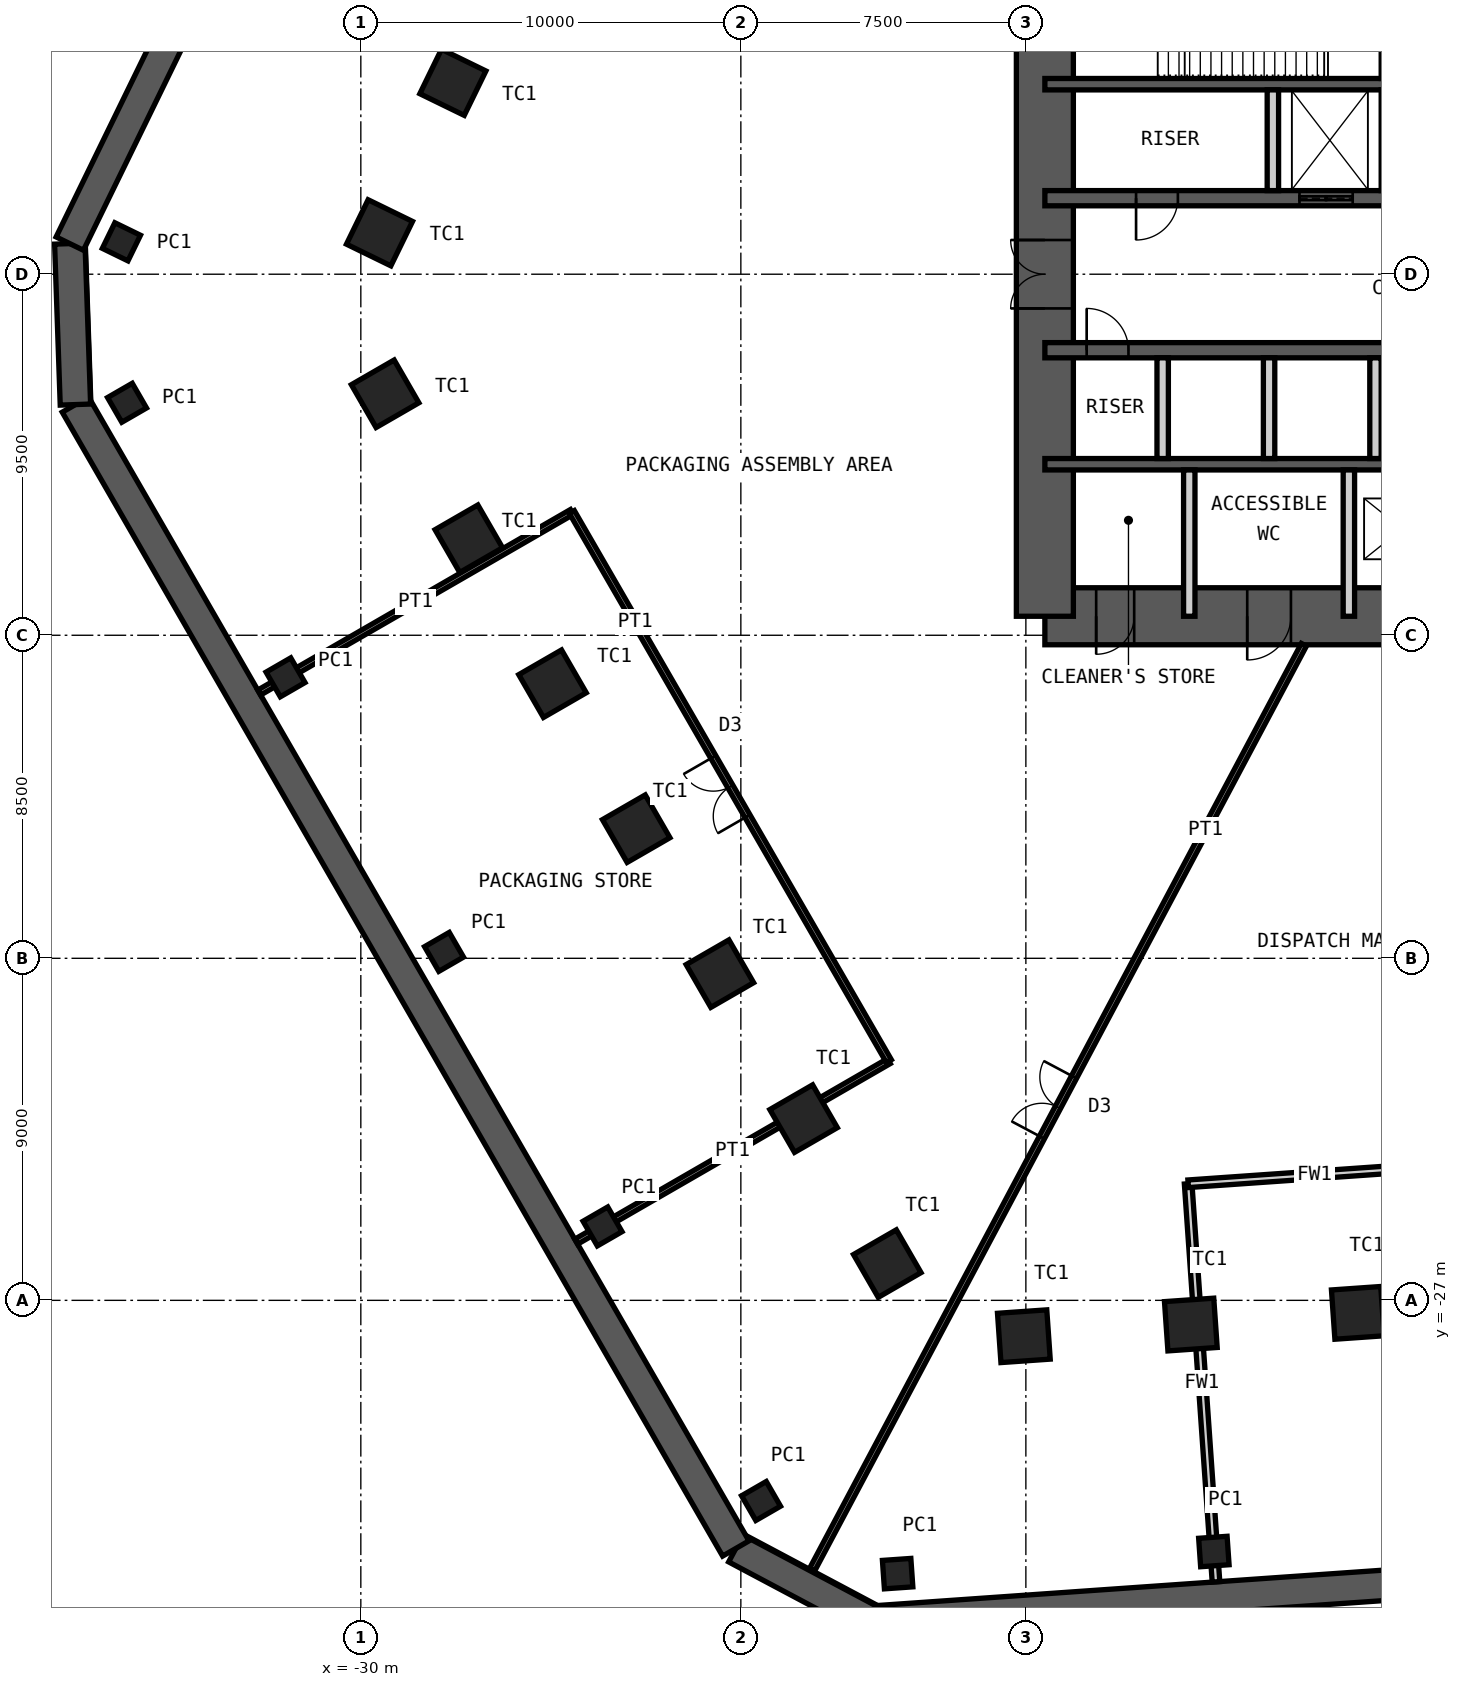
"""IFC4 building model, lengths in metres.
Left out: names, types, materials, properties, quantities, classifications, styles, units other than length and angle.
Written with IfcOpenShell. Run it as: python <this file> out.ifc"""

import sys

from ifc_helpers import new_model, si_unit, direction, frame, frame_2d, origin, origin_2d, place, context, subcontext, project, spatial, rectangle, hollow_rectangle, extrude, element, fill, save


model = new_model("IFC4")
c1 = context("Model", 3, precision=1e-05, world=origin(), true_north=direction((0.0, 1.0)))
c2 = subcontext(c1, "Body", "Model", "MODEL_VIEW")
j1 = project(units=[si_unit("LENGTHUNIT", "METRE"), si_unit("PLANEANGLEUNIT", "RADIAN")], contexts=[c1])
p1 = place(None, origin())
s1 = spatial("IfcSite", under=j1, at=p1, CompositionType="ELEMENT")
p2 = place(p1, origin())
s2 = spatial("IfcBuilding", under=s1, at=p2, CompositionType="ELEMENT")
p3 = place(p2, frame((0.0, 0.0, -6.0)))
s3 = spatial("IfcBuildingStorey", under=s2, at=p3, CompositionType="ELEMENT", Elevation=-6.0)
p4 = place(p3, frame((18.132, -33.016, 0.0), z_axis=(0.0, 0.0, 1.0), x_axis=(-0.997564165932, -0.069754819538, 0.0)))
e1 = element("IfcWall", 1, at=p4, inside=s3, PredefinedType="SHEAR", context=c2, shape_type="SweptSolid", body=[
    extrude(rectangle(XDim=34.755, YDim=0.8, at=frame_2d((17.377, 0.0))), origin(), (0.0, 0.0, 1.0), 6.0),
])
p5 = place(p3, frame((-16.539, -35.44, 0.0), z_axis=(0.0, 0.0, 1.0), x_axis=(-0.882968133669, 0.469432929101, 0.0)))
e2 = element("IfcWall", 2, at=p5, inside=s3, PredefinedType="SHEAR", context=c2, shape_type="SweptSolid", body=[
    extrude(rectangle(XDim=4.071, YDim=0.8, at=frame_2d((2.035, 0.0))), origin(), (0.0, 0.0, 1.0), 6.0),
])
p6 = place(p3, frame((-20.133, -33.529, 0.0), z_axis=(0.0, 0.0, 1.0), x_axis=(-0.499996691743, 0.866027313799, 0.0)))
e3 = element("IfcWall", 3, at=p6, inside=s3, PredefinedType="SHEAR", context=c2, shape_type="SweptSolid", body=[
    extrude(rectangle(XDim=34.755, YDim=0.8, at=frame_2d((17.377, 0.0))), origin(), (0.0, 0.0, 1.0), 6.0),
])
p7 = place(p3, frame((-37.51, -3.43, 0.0), z_axis=(0.0, 0.0, 1.0), x_axis=(-0.034908677553, 0.999390506375, 0.0)))
e4 = element("IfcWall", 4, at=p7, inside=s3, PredefinedType="SHEAR", context=c2, shape_type="SweptSolid", body=[
    extrude(rectangle(XDim=4.238, YDim=0.8, at=frame_2d((2.119, 0.0))), origin(), (0.0, 0.0, 1.0), 6.0),
])
p8 = place(p3, frame((-37.658, 0.805, 0.0), z_axis=(0.0, 0.0, 1.0), x_axis=(0.438371731429, 0.898793761151, 0.0)))
e5 = element("IfcWall", 5, at=p8, inside=s3, PredefinedType="SHEAR", context=c2, shape_type="SweptSolid", body=[
    extrude(rectangle(XDim=34.755, YDim=0.8, at=frame_2d((17.377, 0.0))), origin(), (0.0, 0.0, 1.0), 6.0),
])
for number, where, z_axis, x_axis in (
    (6, (-3.765, -27.329, 0.0), (0.0, 0.0, 1.0), (0.998, 0.07, 0.0)),
    (7, (-8.159, -27.636, 0.0), (0.0, 0.0, 1.0), (0.998, 0.07, 0.0)),
    (8, (-12.553, -27.944, 0.0), (0.0, 0.0, 1.0), (0.998, 0.07, 0.0)),
    (9, (-16.147, -26.033, 0.0), (0.0, 0.0, 1.0), (0.5, -0.866, 0.0)),
    (10, (-18.349, -22.218, 0.0), (0.0, 0.0, 1.0), (0.5, -0.866, 0.0)),
    (11, (-20.552, -18.404, 0.0), (0.0, 0.0, 1.0), (0.5, -0.866, 0.0)),
    (12, (-22.754, -14.589, 0.0), (0.0, 0.0, 1.0), (0.5, -0.866, 0.0)),
    (13, (-24.956, -10.775, 0.0), (0.0, 0.0, 1.0), (0.5, -0.866, 0.0)),
    (14, (-27.158, -6.96, 0.0), (0.0, 0.0, 1.0), (0.5, -0.866, 0.0)),
    (15, (-29.361, -3.146, 0.0), (0.0, 0.0, 1.0), (0.5, -0.866, 0.0)),
    (16, (-29.509, 1.09, 0.0), (0.0, 0.0, 1.0), (-0.438, -0.899, 0.0)),
    (17, (-27.578, 5.049, 0.0), (0.0, 0.0, 1.0), (-0.438, -0.899, 0.0)),
):
    element("IfcColumn", number, at=place(p3, frame(where, z_axis=z_axis, x_axis=x_axis)), inside=s3, PredefinedType="COLUMN", context=c2, shape_type="SweptSolid", body=[
        extrude(hollow_rectangle(XDim=1.3, YDim=1.3, WallThickness=0.1, at=origin_2d()), origin(), (0.0, 0.0, 1.0), 6.0),
    ])
for number, where, z_axis, x_axis in (
    (18, (-7.553, -33.609, 0.0), (0.0, 0.0, 1.0), (0.998, 0.07, 0.0)),
    (19, (-19.469, -32.28, 0.0), (0.0, 0.0, 1.0), (0.5, -0.866, 0.0)),
    (20, (-23.639, -25.055, 0.0), (0.0, 0.0, 1.0), (0.5, -0.866, 0.0)),
    (21, (-27.81, -17.831, 0.0), (0.0, 0.0, 1.0), (0.5, -0.866, 0.0)),
    (22, (-31.981, -10.607, 0.0), (0.0, 0.0, 1.0), (0.5, -0.866, 0.0)),
    (23, (-36.3, 0.853, 0.0), (0.0, 0.0, 1.0), (-0.438, -0.899, 0.0)),
    (24, (-15.874, -34.191, 0.0), (0.0, 0.0, 1.0), (0.998, 0.07, 0.0)),
    (25, (-36.152, -3.383, 0.0), (0.0, 0.0, 1.0), (0.5, -0.866, 0.0)),
):
    element("IfcColumn", number, at=place(p3, frame(where, z_axis=z_axis, x_axis=x_axis)), inside=s3, PredefinedType="COLUMN", context=c2, shape_type="SweptSolid", body=[
        extrude(hollow_rectangle(XDim=0.75, YDim=0.75, WallThickness=0.036, at=origin_2d()), origin(), (0.0, 0.0, 1.0), 6.0),
    ])
p9 = place(p3, frame((-12.0, -9.0, 0.0), z_axis=(0.0, 0.0, 1.0), x_axis=(1.0, 0.0, 0.0)))
e26 = element("IfcWall", 26, at=p9, inside=s3, PredefinedType="SHEAR", context=c2, shape_type="SweptSolid", body=[
    extrude(rectangle(XDim=24.0, YDim=1.5, at=frame_2d((12.0, 0.0))), origin(), (0.0, 0.0, 1.0), 6.0),
])
p10 = place(p9, frame((1.35, 0.0, 0.0)))
e27 = element("IfcOpeningElement", 27, at=p10, cuts=e26, PredefinedType="OPENING", context=c2, shape_type="SweptSolid", body=[
    extrude(rectangle(XDim=1.0, YDim=2.1, at=frame_2d((0.5, 1.05))), frame((0.0, 0.76, 0.0), z_axis=(0.0, -1.0, 0.0), x_axis=(1.0, 0.0, 0.0)), (0.0, 0.0, 1.0), 1.52),
])
p11 = place(p9, frame((5.325, 0.0, 0.0)))
e28 = element("IfcOpeningElement", 28, at=p11, cuts=e26, PredefinedType="OPENING", context=c2, shape_type="SweptSolid", body=[
    extrude(rectangle(XDim=1.15, YDim=2.1, at=frame_2d((0.575, 1.05))), frame((0.0, 0.76, 0.0), z_axis=(0.0, -1.0, 0.0), x_axis=(1.0, 0.0, 0.0)), (0.0, 0.0, 1.0), 1.52),
])
p12 = place(p9, frame((12.6, 0.0, 0.0)))
e29 = element("IfcOpeningElement", 29, at=p12, cuts=e26, PredefinedType="OPENING", context=c2, shape_type="SweptSolid", body=[
    extrude(rectangle(XDim=1.0, YDim=2.1, at=frame_2d((0.5, 1.05))), frame((0.0, 0.76, 0.0), z_axis=(0.0, -1.0, 0.0), x_axis=(1.0, 0.0, 0.0)), (0.0, 0.0, 1.0), 1.52),
])
p13 = place(p3, frame((-12.0, -9.0, 0.0), z_axis=(0.0, 0.0, 1.0), x_axis=(0.0, 1.0, 0.0)))
e30 = element("IfcWall", 30, at=p13, inside=s3, PredefinedType="SHEAR", context=c2, shape_type="SweptSolid", body=[
    extrude(rectangle(XDim=18.0, YDim=1.5, at=frame_2d((9.0, 0.0))), origin(), (0.0, 0.0, 1.0), 6.0),
])
p14 = place(p13, frame((8.1, 0.0, 0.0)))
e31 = element("IfcOpeningElement", 31, at=p14, cuts=e30, PredefinedType="OPENING", context=c2, shape_type="SweptSolid", body=[
    extrude(rectangle(XDim=1.8, YDim=2.1, at=frame_2d((0.9, 1.05))), frame((0.0, 0.76, 0.0), z_axis=(0.0, -1.0, 0.0), x_axis=(1.0, 0.0, 0.0)), (0.0, 0.0, 1.0), 1.52),
])
p15 = place(p3, frame((-12.0, 5.0, 0.0), z_axis=(0.0, 0.0, 1.0), x_axis=(1.0, 0.0, 0.0)))
e32 = element("IfcWall", 32, at=p15, inside=s3, PredefinedType="SHEAR", context=c2, shape_type="SweptSolid", body=[
    extrude(rectangle(XDim=24.0, YDim=0.3, at=frame_2d((12.0, 0.0))), origin(), (0.0, 0.0, 1.0), 6.0),
])
p16 = place(p3, frame((-12.0, 2.0, 0.0), z_axis=(0.0, 0.0, 1.0), x_axis=(1.0, 0.0, 0.0)))
e33 = element("IfcWall", 33, at=p16, inside=s3, PredefinedType="SHEAR", context=c2, shape_type="SweptSolid", body=[
    extrude(rectangle(XDim=24.0, YDim=0.4, at=frame_2d((12.0, 0.0))), origin(), (0.0, 0.0, 1.0), 6.0),
])
p17 = place(p16, frame((2.4, 0.0, 0.0)))
e34 = element("IfcOpeningElement", 34, at=p17, cuts=e33, PredefinedType="OPENING", context=c2, shape_type="SweptSolid", body=[
    extrude(rectangle(XDim=1.1, YDim=2.1, at=frame_2d((0.55, 1.05))), frame((0.0, 0.21, 0.0), z_axis=(0.0, -1.0, 0.0), x_axis=(1.0, 0.0, 0.0)), (0.0, 0.0, 1.0), 0.42),
])
p18 = place(p16, frame((22.0, 0.0, 0.0)))
e35 = element("IfcOpeningElement", 35, at=p18, cuts=e33, PredefinedType="OPENING", context=c2, shape_type="SweptSolid", body=[
    extrude(rectangle(XDim=1.1, YDim=2.1, at=frame_2d((0.55, 1.05))), frame((0.0, 0.21, 0.0), z_axis=(0.0, -1.0, 0.0), x_axis=(1.0, 0.0, 0.0)), (0.0, 0.0, 1.0), 0.42),
])
p19 = place(p16, frame((10.15, 0.0, 0.0)))
e36 = element("IfcOpeningElement", 36, at=p19, cuts=e33, PredefinedType="OPENING", context=c2, shape_type="SweptSolid", body=[
    extrude(rectangle(XDim=1.0, YDim=2.1, at=frame_2d((0.5, 1.05))), frame((0.0, 0.21, 0.0), z_axis=(0.0, -1.0, 0.0), x_axis=(1.0, 0.0, 0.0)), (0.0, 0.0, 1.0), 0.42),
])
p20 = place(p16, frame((6.7, 0.0, 0.0)))
e37 = element("IfcOpeningElement", 37, at=p20, cuts=e33, PredefinedType="OPENING", context=c2, shape_type="SweptSolid", body=[
    extrude(rectangle(XDim=1.4, YDim=2.4, at=frame_2d((0.7, 1.2))), frame((0.0, 0.21, 0.0), z_axis=(0.0, -1.0, 0.0), x_axis=(1.0, 0.0, 0.0)), (0.0, 0.0, 1.0), 0.42),
])
p21 = place(p3, frame((-12.0, -2.0, 0.0), z_axis=(0.0, 0.0, 1.0), x_axis=(1.0, 0.0, 0.0)))
e38 = element("IfcWall", 38, at=p21, inside=s3, PredefinedType="SHEAR", context=c2, shape_type="SweptSolid", body=[
    extrude(rectangle(XDim=24.0, YDim=0.4, at=frame_2d((12.0, 0.0))), origin(), (0.0, 0.0, 1.0), 6.0),
])
p22 = place(p21, frame((1.1, 0.0, 0.0)))
e39 = element("IfcOpeningElement", 39, at=p22, cuts=e38, PredefinedType="OPENING", context=c2, shape_type="SweptSolid", body=[
    extrude(rectangle(XDim=1.1, YDim=2.1, at=frame_2d((0.55, 1.05))), frame((0.0, 0.21, 0.0), z_axis=(0.0, -1.0, 0.0), x_axis=(1.0, 0.0, 0.0)), (0.0, 0.0, 1.0), 0.42),
])
p23 = place(p21, frame((13.55, 0.0, 0.0)))
e40 = element("IfcOpeningElement", 40, at=p23, cuts=e38, PredefinedType="OPENING", context=c2, shape_type="SweptSolid", body=[
    extrude(rectangle(XDim=1.1, YDim=2.1, at=frame_2d((0.55, 1.05))), frame((0.0, 0.21, 0.0), z_axis=(0.0, -1.0, 0.0), x_axis=(1.0, 0.0, 0.0)), (0.0, 0.0, 1.0), 0.42),
])
p24 = place(p21, frame((20.7, 0.0, 0.0)))
e41 = element("IfcOpeningElement", 41, at=p24, cuts=e38, PredefinedType="OPENING", context=c2, shape_type="SweptSolid", body=[
    extrude(rectangle(XDim=1.1, YDim=2.1, at=frame_2d((0.55, 1.05))), frame((0.0, 0.21, 0.0), z_axis=(0.0, -1.0, 0.0), x_axis=(1.0, 0.0, 0.0)), (0.0, 0.0, 1.0), 0.42),
])
p25 = place(p3, frame((-12.0, -5.0, 0.0), z_axis=(0.0, 0.0, 1.0), x_axis=(1.0, 0.0, 0.0)))
e42 = element("IfcWall", 42, at=p25, inside=s3, PredefinedType="SHEAR", context=c2, shape_type="SweptSolid", body=[
    extrude(rectangle(XDim=24.0, YDim=0.3, at=frame_2d((12.0, 0.0))), origin(), (0.0, 0.0, 1.0), 6.0),
])
p26 = place(p3, frame((-3.0, 5.15, 0.0), z_axis=(0.0, 0.0, 1.0), x_axis=(0.0, 1.0, 0.0)))
e43 = element("IfcWall", 43, at=p26, inside=s3, PredefinedType="PARTITIONING", context=c2, shape_type="SweptSolid", body=[
    extrude(rectangle(XDim=3.85, YDim=0.3, at=frame_2d((1.925, 0.0))), origin(), (0.0, 0.0, 1.0), 5.78),
])
p27 = place(p26, frame((1.425, 0.0, 0.0)))
e44 = element("IfcOpeningElement", 44, at=p27, cuts=e43, PredefinedType="OPENING", context=c2, shape_type="SweptSolid", body=[
    extrude(rectangle(XDim=1.0, YDim=2.1, at=frame_2d((0.5, 1.05))), frame((0.0, 0.16, 0.0), z_axis=(0.0, -1.0, 0.0), x_axis=(1.0, 0.0, 0.0)), (0.0, 0.0, 1.0), 0.32),
])
for number, where, z_axis, x_axis in (
    (45, (-6.0, 2.2, 0.0), (0.0, 0.0, 1.0), (0.0, 1.0, 0.0)),
    (46, (-3.0, 2.2, 0.0), (0.0, 0.0, 1.0), (0.0, 1.0, 0.0)),
    (47, (-8.9, -4.85, 0.0), (0.0, 0.0, 1.0), (0.0, 1.0, 0.0)),
    (48, (-6.1, -4.85, 0.0), (0.0, 0.0, 1.0), (0.0, 1.0, 0.0)),
    (49, (-3.3, -4.85, 0.0), (0.0, 0.0, 1.0), (0.0, 1.0, 0.0)),
):
    element("IfcWall", number, at=place(p3, frame(where, z_axis=z_axis, x_axis=x_axis)), inside=s3, PredefinedType="PARTITIONING", context=c2, shape_type="SweptSolid", body=[
        extrude(rectangle(XDim=2.65, YDim=0.3, at=frame_2d((1.325, 0.0))), origin(), (0.0, 0.0, 1.0), 5.78),
    ])
for number, where, z_axis, x_axis in (
    (50, (-8.2, -9.0, 0.0), (0.0, 0.0, 1.0), (0.0, 1.0, 0.0)),
    (51, (-4.0, -9.0, 0.0), (0.0, 0.0, 1.0), (0.0, 1.0, 0.0)),
):
    element("IfcWall", number, at=place(p3, frame(where, z_axis=z_axis, x_axis=x_axis)), inside=s3, PredefinedType="PARTITIONING", context=c2, shape_type="SweptSolid", body=[
        extrude(rectangle(XDim=3.85, YDim=0.3, at=frame_2d((1.925, 0.0))), origin(), (0.0, 0.0, 1.0), 5.78),
    ])
p28 = place(p3, frame((-7.497, -34.407, 0.0), z_axis=(0.0, 0.0, 1.0), x_axis=(-0.069754853754, 0.997564163539, 0.0)))
e52 = element("IfcWall", 52, at=p28, inside=s3, PredefinedType="PARTITIONING", context=c2, shape_type="SweptSolid", body=[
    extrude(rectangle(XDim=10.5, YDim=0.2, at=frame_2d((5.25, 0.0))), origin(), (0.0, 0.0, 1.0), 5.75),
])
p29 = place(p3, frame((8.413, -22.769, 0.0), z_axis=(0.0, 0.0, 1.0), x_axis=(-0.997563888187, -0.069758791459, 0.0)))
e53 = element("IfcWall", 53, at=p29, inside=s3, PredefinedType="PARTITIONING", context=c2, shape_type="SweptSolid", body=[
    extrude(rectangle(XDim=16.683, YDim=0.2, at=frame_2d((8.342, 0.0))), origin(), (0.0, 0.0, 1.0), 5.75),
])
p30 = place(p29, frame((7.342, 0.0, 0.0)))
e54 = element("IfcOpeningElement", 54, at=p30, cuts=e53, PredefinedType="OPENING", context=c2, shape_type="SweptSolid", body=[
    extrude(rectangle(XDim=2.0, YDim=2.4, at=frame_2d((1.0, 1.2))), frame((0.0, 0.11, 0.0), z_axis=(0.0, -1.0, 0.0), x_axis=(1.0, 0.0, 0.0)), (0.0, 0.0, 1.0), 0.22),
])
for number, where, z_axis, x_axis in (
    (55, (-24.332, -25.455, 0.0), (0.0, 0.0, 1.0), (0.866, 0.5, 0.0)),
    (56, (-32.674, -11.007, 0.0), (0.0, 0.0, 1.0), (0.866, 0.5, 0.0)),
):
    element("IfcWall", number, at=place(p3, frame(where, z_axis=z_axis, x_axis=x_axis)), inside=s3, PredefinedType="PARTITIONING", context=c2, shape_type="SweptSolid", body=[
        extrude(rectangle(XDim=9.5, YDim=0.15, at=frame_2d((4.75, 0.0))), origin(), (0.0, 0.0, 1.0), 5.75),
    ])
p31 = place(p3, frame((-16.105, -20.705, 0.0), z_axis=(0.0, 0.0, 1.0), x_axis=(-0.500004511595, 0.866022798998, 0.0)))
e57 = element("IfcWall", 57, at=p31, inside=s3, PredefinedType="PARTITIONING", context=c2, shape_type="SweptSolid", body=[
    extrude(rectangle(XDim=16.683, YDim=0.15, at=frame_2d((8.342, 0.0))), origin(), (0.0, 0.0, 1.0), 5.75),
])
p32 = place(p31, frame((7.442, 0.0, 0.0)))
e58 = element("IfcOpeningElement", 58, at=p32, cuts=e57, PredefinedType="OPENING", context=c2, shape_type="SweptSolid", body=[
    extrude(rectangle(XDim=1.8, YDim=2.4, at=frame_2d((0.9, 1.2))), frame((0.0, 0.085, 0.0), z_axis=(0.0, -1.0, 0.0), x_axis=(1.0, 0.0, 0.0)), (0.0, 0.0, 1.0), 0.17),
])
p33 = place(p3, frame((-5.184, -9.75, 0.0), z_axis=(0.0, 0.0, 1.0), x_axis=(-0.469470342993, -0.882948241433, 0.0)))
e59 = element("IfcWall", 59, at=p33, inside=s3, PredefinedType="PARTITIONING", context=c2, shape_type="SweptSolid", body=[
    extrude(rectangle(XDim=27.565, YDim=0.15, at=frame_2d((13.783, 0.0))), origin(), (0.0, 0.0, 1.0), 5.75),
])
p34 = place(p33, frame((12.883, 0.0, 0.0)))
e60 = element("IfcOpeningElement", 60, at=p34, cuts=e59, PredefinedType="OPENING", context=c2, shape_type="SweptSolid", body=[
    extrude(rectangle(XDim=1.8, YDim=2.4, at=frame_2d((0.9, 1.2))), frame((0.0, 0.085, 0.0), z_axis=(0.0, -1.0, 0.0), x_axis=(1.0, 0.0, 0.0)), (0.0, 0.0, 1.0), 0.17),
])
p35 = place(p10, origin())
e61 = element("IfcDoor", 61, at=p35, inside=s3, OperationType="SINGLE_SWING_LEFT", PredefinedType="DOOR", context=c2, shape_type="SweptSolid", body=[
    extrude(rectangle(XDim=1.0, YDim=2.1, at=frame_2d((0.5, 1.05))), frame((0.0, 0.025, 0.0), z_axis=(0.0, -1.0, 0.0), x_axis=(1.0, 0.0, 0.0)), (0.0, 0.0, 1.0), 0.05),
])
fill(e27, e61)
p36 = place(p11, origin())
e62 = element("IfcDoor", 62, at=p36, inside=s3, OperationType="SINGLE_SWING_LEFT", PredefinedType="DOOR", context=c2, shape_type="SweptSolid", body=[
    extrude(rectangle(XDim=1.15, YDim=2.1, at=frame_2d((0.575, 1.05))), frame((0.0, 0.025, 0.0), z_axis=(0.0, -1.0, 0.0), x_axis=(1.0, 0.0, 0.0)), (0.0, 0.0, 1.0), 0.05),
])
fill(e28, e62)
p37 = place(p17, origin())
e63 = element("IfcDoor", 63, at=p37, inside=s3, OperationType="SINGLE_SWING_LEFT", PredefinedType="DOOR", context=c2, shape_type="SweptSolid", body=[
    extrude(rectangle(XDim=1.1, YDim=2.1, at=frame_2d((0.55, 1.05))), frame((0.0, 0.025, 0.0), z_axis=(0.0, -1.0, 0.0), x_axis=(1.0, 0.0, 0.0)), (0.0, 0.0, 1.0), 0.05),
])
fill(e34, e63)
p38 = place(p22, origin())
e64 = element("IfcDoor", 64, at=p38, inside=s3, OperationType="SINGLE_SWING_RIGHT", PredefinedType="DOOR", context=c2, shape_type="SweptSolid", body=[
    extrude(rectangle(XDim=1.1, YDim=2.1, at=frame_2d((0.55, 1.05))), frame((0.0, 0.025, 0.0), z_axis=(0.0, -1.0, 0.0), x_axis=(1.0, 0.0, 0.0)), (0.0, 0.0, 1.0), 0.05),
])
fill(e39, e64)
p39 = place(p14, origin())
e65 = element("IfcDoor", 65, at=p39, inside=s3, OperationType="DOUBLE_DOOR_DOUBLE_SWING", PredefinedType="DOOR", context=c2, shape_type="SweptSolid", body=[
    extrude(rectangle(XDim=1.8, YDim=2.1, at=frame_2d((0.9, 1.05))), frame((0.0, 0.025, 0.0), z_axis=(0.0, -1.0, 0.0), x_axis=(1.0, 0.0, 0.0)), (0.0, 0.0, 1.0), 0.05),
])
fill(e31, e65)
p40 = place(p20, origin())
e66 = element("IfcDoor", 66, at=p40, inside=s3, OperationType="DOUBLE_DOOR_SLIDING", PredefinedType="DOOR", context=c2, shape_type="SweptSolid", body=[
    extrude(rectangle(XDim=1.4, YDim=2.4, at=frame_2d((0.7, 1.2))), frame((0.0, 0.025, 0.0), z_axis=(0.0, -1.0, 0.0), x_axis=(1.0, 0.0, 0.0)), (0.0, 0.0, 1.0), 0.05),
])
fill(e37, e66)
p41 = place(p32, origin())
e67 = element("IfcDoor", 67, at=p41, inside=s3, OperationType="DOUBLE_DOOR_DOUBLE_SWING", PredefinedType="DOOR", context=c2, shape_type="SweptSolid", body=[
    extrude(rectangle(XDim=1.8, YDim=2.4, at=frame_2d((0.9, 1.2))), frame((0.0, 0.025, 0.0), z_axis=(0.0, -1.0, 0.0), x_axis=(1.0, 0.0, 0.0)), (0.0, 0.0, 1.0), 0.05),
])
fill(e58, e67)
p42 = place(p34, origin())
e68 = element("IfcDoor", 68, at=p42, inside=s3, OperationType="DOUBLE_DOOR_DOUBLE_SWING", PredefinedType="DOOR", context=c2, shape_type="SweptSolid", body=[
    extrude(rectangle(XDim=1.8, YDim=2.4, at=frame_2d((0.9, 1.2))), frame((0.0, 0.025, 0.0), z_axis=(0.0, -1.0, 0.0), x_axis=(1.0, 0.0, 0.0)), (0.0, 0.0, 1.0), 0.05),
])
fill(e60, e68)
save(model, sys.argv[1])
